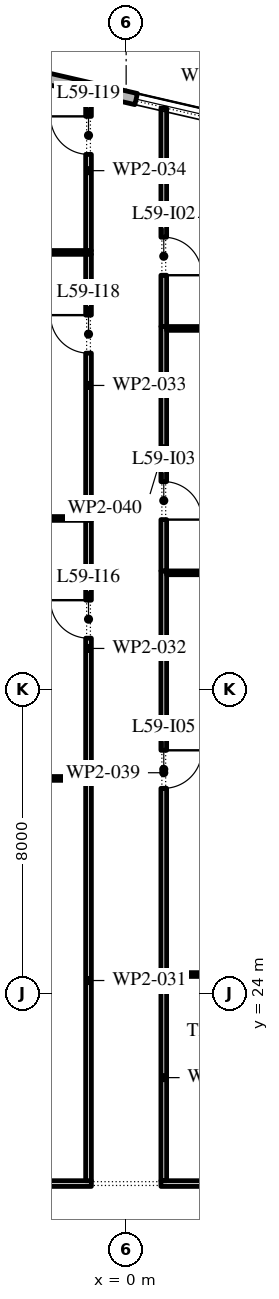
"""IFC4 building model, lengths in metres.
Left out: names, types, materials, properties, quantities, classifications, styles, units other than length and angle.
Written with IfcOpenShell. Run it as: python <this file> out.ifc"""

import sys

from ifc_helpers import new_model, si_unit, direction, frame, frame_2d, origin, place, context, subcontext, project, spatial, rectangle, extrude, element, fill, save


model = new_model("IFC4")
c1 = context("Model", 3, precision=1e-05, world=origin(), true_north=direction((0.0, 1.0)))
c2 = subcontext(c1, "Body", "Model", "MODEL_VIEW")
j1 = project(units=[si_unit("LENGTHUNIT", "METRE"), si_unit("PLANEANGLEUNIT", "RADIAN")], contexts=[c1])
p1 = place(None, origin())
s1 = spatial("IfcSite", under=j1, at=p1, CompositionType="ELEMENT")
p2 = place(p1, origin())
s2 = spatial("IfcBuilding", under=s1, at=p2, CompositionType="ELEMENT")
p3 = place(p2, frame((0.0, 0.0, 272.4)))
s3 = spatial("IfcBuildingStorey", under=s2, at=p3, CompositionType="ELEMENT", Elevation=272.4)
p4 = place(p3, frame((29.616, 40.758, 0.0), z_axis=(0.0, 0.0, 1.0), x_axis=(-0.974370532314, 0.224949029246, 0.0)))
e1 = element("IfcWall", 1, at=p4, inside=s3, PredefinedType="STANDARD", context=c2, shape_type="SweptSolid", body=[
    extrude(rectangle(XDim=48.0, YDim=0.3, at=frame_2d((24.0, 0.0))), origin(), (0.0, 0.0, 1.0), 4.0),
])
p5 = place(p4, frame((1.625, 0.0, 0.45)))
e2 = element("IfcOpeningElement", 2, at=p5, cuts=e1, PredefinedType="OPENING", context=c2, shape_type="SweptSolid", body=[
    extrude(rectangle(XDim=4.5, YDim=2.575, at=frame_2d((2.25, 1.288))), frame((0.0, 0.16, 0.0), z_axis=(0.0, -1.0, 0.0), x_axis=(1.0, 0.0, 0.0)), (0.0, 0.0, 1.0), 0.32),
])
p6 = place(p4, frame((10.575, 0.0, 0.0)))
e3 = element("IfcOpeningElement", 3, at=p6, cuts=e1, PredefinedType="OPENING", context=c2, shape_type="SweptSolid", body=[
    extrude(rectangle(XDim=2.4, YDim=3.5, at=frame_2d((1.2, 1.75))), frame((0.0, 0.16, 0.0), z_axis=(0.0, -1.0, 0.0), x_axis=(1.0, 0.0, 0.0)), (0.0, 0.0, 1.0), 0.32),
])
p7 = place(p4, frame((17.575, 0.0, 0.45)))
e4 = element("IfcOpeningElement", 4, at=p7, cuts=e1, PredefinedType="OPENING", context=c2, shape_type="SweptSolid", body=[
    extrude(rectangle(XDim=4.5, YDim=2.45, at=frame_2d((2.25, 1.225))), frame((0.0, 0.16, 0.0), z_axis=(0.0, -1.0, 0.0), x_axis=(1.0, 0.0, 0.0)), (0.0, 0.0, 1.0), 0.32),
])
p8 = place(p4, frame((25.625, 0.0, 0.45)))
e5 = element("IfcOpeningElement", 5, at=p8, cuts=e1, PredefinedType="OPENING", context=c2, shape_type="SweptSolid", body=[
    extrude(rectangle(XDim=4.5, YDim=2.45, at=frame_2d((2.25, 1.225))), frame((0.0, 0.16, 0.0), z_axis=(0.0, -1.0, 0.0), x_axis=(1.0, 0.0, 0.0)), (0.0, 0.0, 1.0), 0.32),
])
p9 = place(p4, frame((33.675, 0.0, 0.45)))
e6 = element("IfcOpeningElement", 6, at=p9, cuts=e1, PredefinedType="OPENING", context=c2, shape_type="SweptSolid", body=[
    extrude(rectangle(XDim=4.5, YDim=2.45, at=frame_2d((2.25, 1.225))), frame((0.0, 0.16, 0.0), z_axis=(0.0, -1.0, 0.0), x_axis=(1.0, 0.0, 0.0)), (0.0, 0.0, 1.0), 0.32),
])
p10 = place(p4, frame((42.175, 0.0, 0.0)))
e7 = element("IfcOpeningElement", 7, at=p10, cuts=e1, PredefinedType="OPENING", context=c2, shape_type="SweptSolid", body=[
    extrude(rectangle(XDim=2.4, YDim=3.5, at=frame_2d((1.2, 1.75))), frame((0.0, 0.16, 0.0), z_axis=(0.0, -1.0, 0.0), x_axis=(1.0, 0.0, 0.0)), (0.0, 0.0, 1.0), 0.32),
])
p11 = place(p3, frame((-8.275, 19.0, 0.0), z_axis=(0.0, 0.0, 1.0), x_axis=(1.0, 0.0, 0.0)))
e8 = element("IfcWall", 8, at=p11, inside=s3, PredefinedType="PARTITIONING", context=c2, shape_type="SweptSolid", body=[
    extrude(rectangle(XDim=7.36, YDim=0.15, at=frame_2d((3.68, 0.0))), origin(), (0.0, 0.0, 1.0), 4.0),
])
p12 = place(p3, frame((-8.125, 29.66, 0.0), z_axis=(0.0, 0.0, 1.0), x_axis=(1.0, 0.0, 0.0)))
e9 = element("IfcWall", 9, at=p12, inside=s3, PredefinedType="PARTITIONING", context=c2, shape_type="SweptSolid", body=[
    extrude(rectangle(XDim=7.21, YDim=0.1, at=frame_2d((3.605, 0.0))), origin(), (0.0, 0.0, 1.0), 4.0),
])
p13 = place(p3, frame((-5.95, 36.5, 0.0), z_axis=(0.0, 0.0, 1.0), x_axis=(1.0, 0.0, 0.0)))
e10 = element("IfcWall", 10, at=p13, inside=s3, PredefinedType="PARTITIONING", context=c2, shape_type="SweptSolid", body=[
    extrude(rectangle(XDim=5.035, YDim=0.1, at=frame_2d((2.518, 0.0))), origin(), (0.0, 0.0, 1.0), 4.0),
])
p14 = place(p3, frame((-6.0, 43.5, 0.0), z_axis=(0.0, 0.0, 1.0), x_axis=(1.0, 0.0, 0.0)))
e11 = element("IfcWall", 11, at=p14, inside=s3, PredefinedType="PARTITIONING", context=c2, shape_type="SweptSolid", body=[
    extrude(rectangle(XDim=5.085, YDim=0.1, at=frame_2d((2.542, 0.0))), origin(), (0.0, 0.0, 1.0), 4.0),
])
p15 = place(p3, frame((-0.99, 19.075, 0.0), z_axis=(0.0, 0.0, 1.0), x_axis=(0.0, 1.0, 0.0)))
e12 = element("IfcWall", 12, at=p15, inside=s3, PredefinedType="PARTITIONING", context=c2, shape_type="SweptSolid", body=[
    extrude(rectangle(XDim=10.535, YDim=0.15, at=frame_2d((5.268, 0.0))), origin(), (0.0, 0.0, 1.0), 4.0),
])
p16 = place(p3, frame((-0.99, 29.71, 0.0), z_axis=(0.0, 0.0, 1.0), x_axis=(0.0, 1.0, 0.0)))
e13 = element("IfcWall", 13, at=p16, inside=s3, PredefinedType="PARTITIONING", context=c2, shape_type="SweptSolid", body=[
    extrude(rectangle(XDim=6.74, YDim=0.15, at=frame_2d((3.37, 0.0))), origin(), (0.0, 0.0, 1.0), 4.0),
])
p17 = place(p16, frame((3.64, 0.0, 0.0)))
e14 = element("IfcOpeningElement", 14, at=p17, cuts=e13, PredefinedType="OPENING", context=c2, shape_type="SweptSolid", body=[
    extrude(rectangle(XDim=1.0, YDim=2.1, at=frame_2d((0.5, 1.05))), frame((0.0, 0.085, 0.0), z_axis=(0.0, -1.0, 0.0), x_axis=(1.0, 0.0, 0.0)), (0.0, 0.0, 1.0), 0.17),
])
p18 = place(p3, frame((-0.99, 36.55, 0.0), z_axis=(0.0, 0.0, 1.0), x_axis=(0.0, 1.0, 0.0)))
e15 = element("IfcWall", 15, at=p18, inside=s3, PredefinedType="PARTITIONING", context=c2, shape_type="SweptSolid", body=[
    extrude(rectangle(XDim=6.9, YDim=0.15, at=frame_2d((3.45, 0.0))), origin(), (0.0, 0.0, 1.0), 4.0),
])
p19 = place(p18, frame((4.3, 0.0, 0.0)))
e16 = element("IfcOpeningElement", 16, at=p19, cuts=e15, PredefinedType="OPENING", context=c2, shape_type="SweptSolid", body=[
    extrude(rectangle(XDim=1.0, YDim=2.1, at=frame_2d((0.5, 1.05))), frame((0.0, 0.085, 0.0), z_axis=(0.0, -1.0, 0.0), x_axis=(1.0, 0.0, 0.0)), (0.0, 0.0, 1.0), 0.17),
])
p20 = place(p3, frame((-0.99, 43.55, 0.0), z_axis=(0.0, 0.0, 1.0), x_axis=(0.0, 1.0, 0.0)))
e17 = element("IfcWall", 17, at=p20, inside=s3, PredefinedType="PARTITIONING", context=c2, shape_type="SweptSolid", body=[
    extrude(rectangle(XDim=4.203, YDim=0.15, at=frame_2d((2.102, 0.0))), origin(), (0.0, 0.0, 1.0), 4.0),
])
p21 = place(p20, frame((2.53, 0.0, 0.0)))
e18 = element("IfcOpeningElement", 18, at=p21, cuts=e17, PredefinedType="OPENING", context=c2, shape_type="SweptSolid", body=[
    extrude(rectangle(XDim=1.0, YDim=2.1, at=frame_2d((0.5, 1.05))), frame((0.0, 0.085, 0.0), z_axis=(0.0, -1.0, 0.0), x_axis=(1.0, 0.0, 0.0)), (0.0, 0.0, 1.0), 0.17),
])
p22 = place(p3, frame((0.915, 19.0, 0.0), z_axis=(0.0, 0.0, 1.0), x_axis=(1.0, 0.0, 0.0)))
e19 = element("IfcWall", 19, at=p22, inside=s3, PredefinedType="PARTITIONING", context=c2, shape_type="SweptSolid", body=[
    extrude(rectangle(XDim=7.36, YDim=0.15, at=frame_2d((3.68, 0.0))), origin(), (0.0, 0.0, 1.0), 4.0),
])
p23 = place(p22, frame((4.635, 0.0, 0.0)))
e20 = element("IfcOpeningElement", 20, at=p23, cuts=e19, PredefinedType="OPENING", context=c2, shape_type="SweptSolid", body=[
    extrude(rectangle(XDim=1.0, YDim=2.1, at=frame_2d((0.5, 1.05))), frame((0.0, 0.085, 0.0), z_axis=(0.0, -1.0, 0.0), x_axis=(1.0, 0.0, 0.0)), (0.0, 0.0, 1.0), 0.17),
])
p24 = place(p3, frame((0.99, 24.5, 0.0), z_axis=(0.0, 0.0, 1.0), x_axis=(0.0, -1.0, 0.0)))
e21 = element("IfcWall", 21, at=p24, inside=s3, PredefinedType="PARTITIONING", context=c2, shape_type="SweptSolid", body=[
    extrude(rectangle(XDim=5.425, YDim=0.15, at=frame_2d((2.712, 0.0))), origin(), (0.0, 0.0, 1.0), 4.0),
])
p25 = place(p3, frame((1.065, 24.5, 0.0), z_axis=(0.0, 0.0, 1.0), x_axis=(1.0, 0.0, 0.0)))
e22 = element("IfcWall", 22, at=p25, inside=s3, PredefinedType="PARTITIONING", context=c2, shape_type="SweptSolid", body=[
    extrude(rectangle(XDim=7.21, YDim=0.1, at=frame_2d((3.605, 0.0))), origin(), (0.0, 0.0, 1.0), 4.0),
])
p26 = place(p3, frame((0.99, 35.12, 0.0), z_axis=(0.0, 0.0, 1.0), x_axis=(0.0, -1.0, 0.0)))
e23 = element("IfcWall", 23, at=p26, inside=s3, PredefinedType="PARTITIONING", context=c2, shape_type="SweptSolid", body=[
    extrude(rectangle(XDim=10.62, YDim=0.15, at=frame_2d((5.31, 0.0))), origin(), (0.0, 0.0, 1.0), 4.0),
])
p27 = place(p26, frame((4.72, 0.0, 0.0)))
e24 = element("IfcOpeningElement", 24, at=p27, cuts=e23, PredefinedType="OPENING", context=c2, shape_type="SweptSolid", body=[
    extrude(rectangle(XDim=1.0, YDim=2.1, at=frame_2d((0.5, 1.05))), frame((0.0, 0.085, 0.0), z_axis=(0.0, -1.0, 0.0), x_axis=(1.0, 0.0, 0.0)), (0.0, 0.0, 1.0), 0.17),
])
p28 = place(p3, frame((0.99, 41.55, 0.0), z_axis=(0.0, 0.0, 1.0), x_axis=(0.0, -1.0, 0.0)))
e25 = element("IfcWall", 25, at=p28, inside=s3, PredefinedType="PARTITIONING", context=c2, shape_type="SweptSolid", body=[
    extrude(rectangle(XDim=6.43, YDim=0.15, at=frame_2d((3.215, 0.0))), origin(), (0.0, 0.0, 1.0), 4.0),
])
p29 = place(p28, frame((4.08, 0.0, 0.0)))
e26 = element("IfcOpeningElement", 26, at=p29, cuts=e25, PredefinedType="OPENING", context=c2, shape_type="SweptSolid", body=[
    extrude(rectangle(XDim=1.0, YDim=2.1, at=frame_2d((0.5, 1.05))), frame((0.0, 0.085, 0.0), z_axis=(0.0, -1.0, 0.0), x_axis=(1.0, 0.0, 0.0)), (0.0, 0.0, 1.0), 0.17),
])
p30 = place(p3, frame((0.99, 47.296, 0.0), z_axis=(0.0, 0.0, 1.0), x_axis=(0.0, -1.0, 0.0)))
e27 = element("IfcWall", 27, at=p30, inside=s3, PredefinedType="PARTITIONING", context=c2, shape_type="SweptSolid", body=[
    extrude(rectangle(XDim=5.746, YDim=0.15, at=frame_2d((2.873, 0.0))), origin(), (0.0, 0.0, 1.0), 4.0),
])
p31 = place(p30, frame((3.396, 0.0, 0.0)))
e28 = element("IfcOpeningElement", 28, at=p31, cuts=e27, PredefinedType="OPENING", context=c2, shape_type="SweptSolid", body=[
    extrude(rectangle(XDim=1.0, YDim=2.1, at=frame_2d((0.5, 1.05))), frame((0.0, 0.085, 0.0), z_axis=(0.0, -1.0, 0.0), x_axis=(1.0, 0.0, 0.0)), (0.0, 0.0, 1.0), 0.17),
])
p32 = place(p3, frame((9.39, 35.07, 0.0), z_axis=(0.0, 0.0, 1.0), x_axis=(-1.0, 0.0, 0.0)))
e29 = element("IfcWall", 29, at=p32, inside=s3, PredefinedType="PARTITIONING", context=c2, shape_type="SweptSolid", body=[
    extrude(rectangle(XDim=8.325, YDim=0.1, at=frame_2d((4.163, 0.0))), origin(), (0.0, 0.0, 1.0), 4.0),
])
p33 = place(p3, frame((9.29, 41.5, 0.0), z_axis=(0.0, 0.0, 1.0), x_axis=(-1.0, 0.0, 0.0)))
e30 = element("IfcWall", 30, at=p33, inside=s3, PredefinedType="PARTITIONING", context=c2, shape_type="SweptSolid", body=[
    extrude(rectangle(XDim=8.225, YDim=0.1, at=frame_2d((4.113, 0.0))), origin(), (0.0, 0.0, 1.0), 4.0),
])
p34 = place(p8, origin())
e31 = element("IfcWindow", 31, at=p34, inside=s3, PartitioningType="DOUBLE_PANEL_VERTICAL", PredefinedType="WINDOW", context=c2, shape_type="SweptSolid", body=[
    extrude(rectangle(XDim=4.5, YDim=2.45, at=frame_2d((2.25, 1.225))), frame((0.0, 0.03, 0.0), z_axis=(0.0, -1.0, 0.0), x_axis=(1.0, 0.0, 0.0)), (0.0, 0.0, 1.0), 0.06),
])
fill(e5, e31)
p35 = place(p31, origin())
e32 = element("IfcDoor", 32, at=p35, inside=s3, OperationType="SINGLE_SWING_LEFT", PredefinedType="DOOR", context=c2, shape_type="SweptSolid", body=[
    extrude(rectangle(XDim=1.0, YDim=2.1, at=frame_2d((0.5, 1.05))), frame((0.0, 0.025, 0.0), z_axis=(0.0, -1.0, 0.0), x_axis=(1.0, 0.0, 0.0)), (0.0, 0.0, 1.0), 0.05),
])
fill(e28, e32)
p36 = place(p29, origin())
e33 = element("IfcDoor", 33, at=p36, inside=s3, OperationType="SINGLE_SWING_LEFT", PredefinedType="DOOR", context=c2, shape_type="SweptSolid", body=[
    extrude(rectangle(XDim=1.0, YDim=2.1, at=frame_2d((0.5, 1.05))), frame((0.0, 0.025, 0.0), z_axis=(0.0, -1.0, 0.0), x_axis=(1.0, 0.0, 0.0)), (0.0, 0.0, 1.0), 0.05),
])
fill(e26, e33)
p37 = place(p27, origin())
e34 = element("IfcDoor", 34, at=p37, inside=s3, OperationType="SINGLE_SWING_RIGHT", PredefinedType="DOOR", context=c2, shape_type="SweptSolid", body=[
    extrude(rectangle(XDim=1.0, YDim=2.1, at=frame_2d((0.5, 1.05))), frame((0.0, 0.025, 0.0), z_axis=(0.0, -1.0, 0.0), x_axis=(1.0, 0.0, 0.0)), (0.0, 0.0, 1.0), 0.05),
])
fill(e24, e34)
p38 = place(p17, origin())
e35 = element("IfcDoor", 35, at=p38, inside=s3, OperationType="SINGLE_SWING_LEFT", PredefinedType="DOOR", context=c2, shape_type="SweptSolid", body=[
    extrude(rectangle(XDim=1.0, YDim=2.1, at=frame_2d((0.5, 1.05))), frame((0.0, 0.025, 0.0), z_axis=(0.0, -1.0, 0.0), x_axis=(1.0, 0.0, 0.0)), (0.0, 0.0, 1.0), 0.05),
])
fill(e14, e35)
p39 = place(p19, origin())
e36 = element("IfcDoor", 36, at=p39, inside=s3, OperationType="SINGLE_SWING_LEFT", PredefinedType="DOOR", context=c2, shape_type="SweptSolid", body=[
    extrude(rectangle(XDim=1.0, YDim=2.1, at=frame_2d((0.5, 1.05))), frame((0.0, 0.025, 0.0), z_axis=(0.0, -1.0, 0.0), x_axis=(1.0, 0.0, 0.0)), (0.0, 0.0, 1.0), 0.05),
])
fill(e16, e36)
p40 = place(p21, origin())
e37 = element("IfcDoor", 37, at=p40, inside=s3, OperationType="SINGLE_SWING_LEFT", PredefinedType="DOOR", context=c2, shape_type="SweptSolid", body=[
    extrude(rectangle(XDim=1.0, YDim=2.1, at=frame_2d((0.5, 1.05))), frame((0.0, 0.025, 0.0), z_axis=(0.0, -1.0, 0.0), x_axis=(1.0, 0.0, 0.0)), (0.0, 0.0, 1.0), 0.05),
])
fill(e18, e37)
save(model, sys.argv[1])
